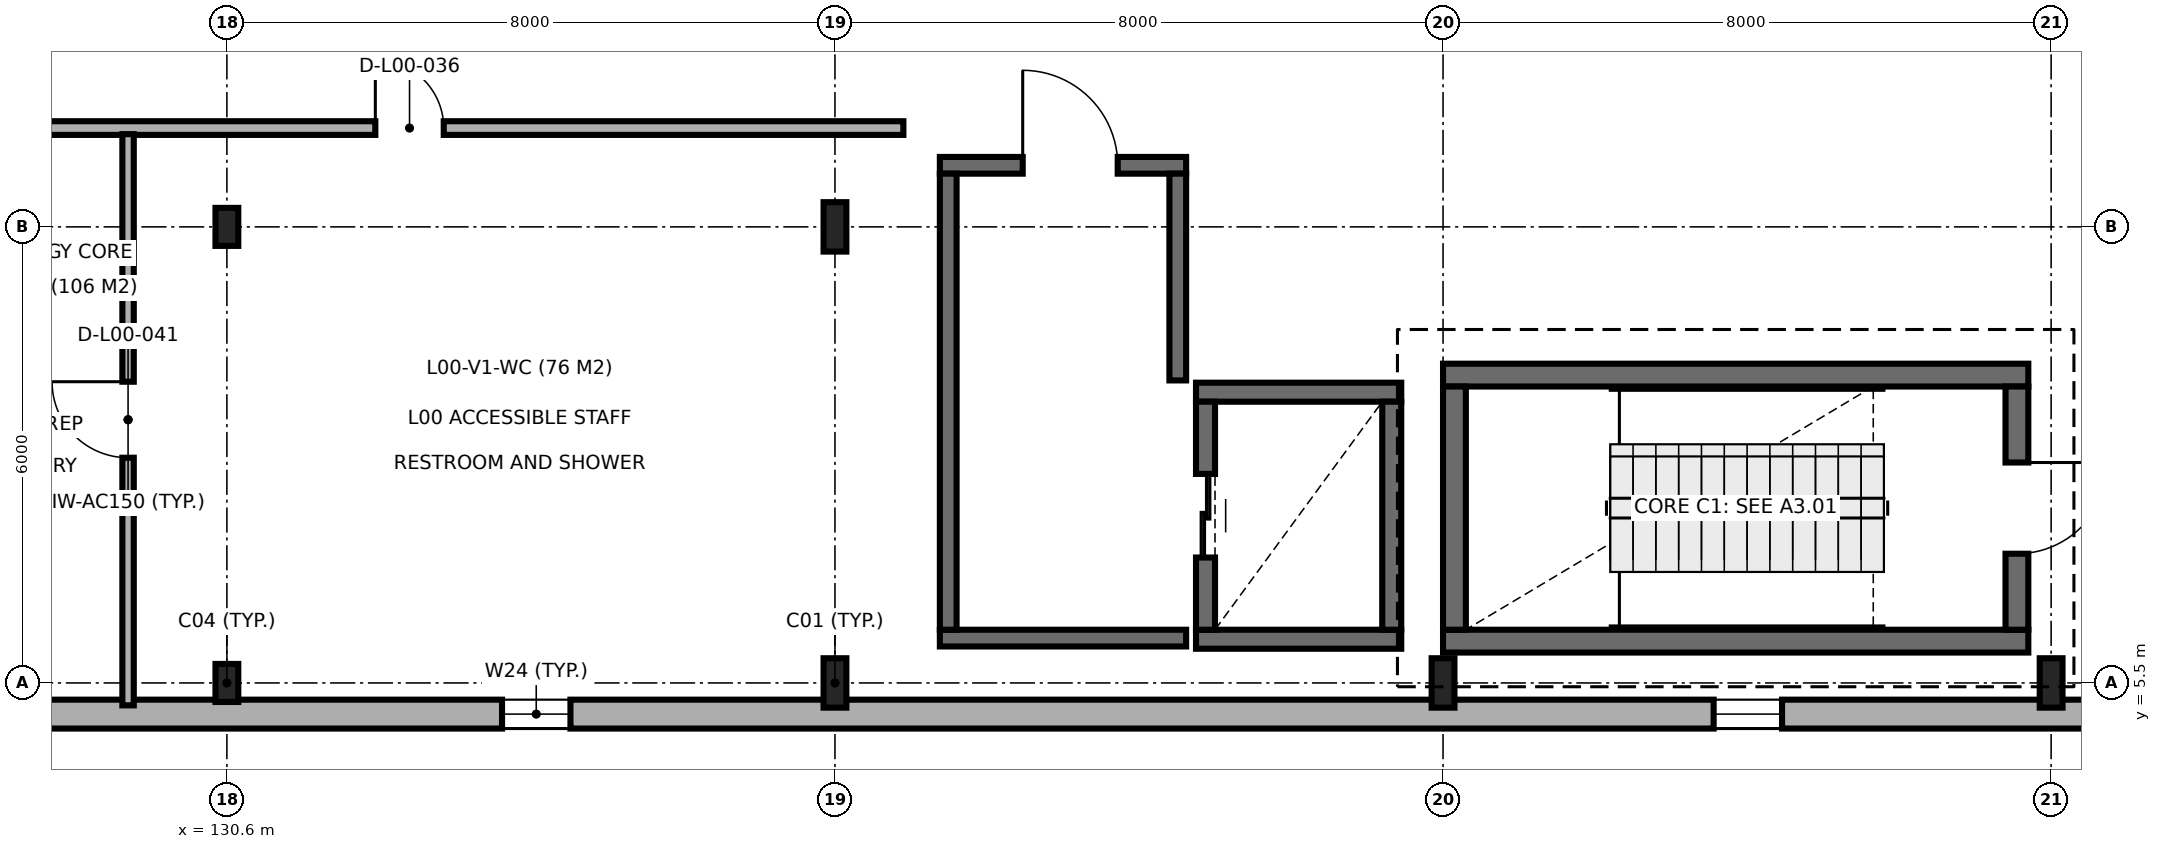
"""IFC4 building model, lengths in metres.
Left out: names, types, materials, properties, quantities, classifications, styles, units other than length and angle.
Written with IfcOpenShell. Run it as: python <this file> out.ifc"""

import sys

from ifc_helpers import new_model, si_unit, direction, frame, frame_2d, origin, origin_2d, place, context, subcontext, project, spatial, rectangle, i_section, extrude, element, fill, save


model = new_model("IFC4")
c1 = context("Model", 3, precision=1e-05, world=origin(), true_north=direction((0.0, 1.0)))
c2 = subcontext(c1, "Body", "Model", "MODEL_VIEW")
j1 = project(units=[si_unit("LENGTHUNIT", "METRE"), si_unit("PLANEANGLEUNIT", "RADIAN")], contexts=[c1])
p1 = place(None, origin())
s1 = spatial("IfcSite", under=j1, at=p1, CompositionType="ELEMENT")
p2 = place(p1, origin())
s2 = spatial("IfcBuilding", under=s1, at=p2, CompositionType="ELEMENT")
p3 = place(p2, origin())
s3 = spatial("IfcBuildingStorey", under=s2, at=p3, CompositionType="ELEMENT", Elevation=0.0)
for number, where, z_axis, x_axis in (
    (1, (130.6, 5.5, 0.0), (0.0, 0.0, 1.0), (1.0, 0.0, 0.0)),
    (2, (130.6, 11.5, 0.0), (0.0, 0.0, 1.0), (1.0, 0.0, 0.0)),
):
    element("IfcColumn", number, at=place(p3, frame(where, z_axis=z_axis, x_axis=x_axis)), inside=s3, PredefinedType="COLUMN", context=c2, shape_type="SweptSolid", body=[
        extrude(i_section(OverallWidth=0.3, OverallDepth=0.5, WebThickness=0.014, FlangeThickness=0.028, FilletRadius=0.027, at=origin_2d()), origin(), (0.0, 0.0, 1.0), 4.8),
    ])
for number, where, z_axis, x_axis in (
    (3, (138.6, 5.5, 0.0), (0.0, 0.0, 1.0), (1.0, 0.0, 0.0)),
    (4, (138.6, 11.5, 0.0), (0.0, 0.0, 1.0), (1.0, 0.0, 0.0)),
    (5, (146.6, 5.5, 0.0), (0.0, 0.0, 1.0), (1.0, 0.0, 0.0)),
    (6, (154.6, 5.5, 0.0), (0.0, 0.0, 1.0), (1.0, 0.0, 0.0)),
):
    element("IfcColumn", number, at=place(p3, frame(where, z_axis=z_axis, x_axis=x_axis)), inside=s3, PredefinedType="COLUMN", context=c2, shape_type="SweptSolid", body=[
        extrude(i_section(OverallWidth=0.3, OverallDepth=0.65, WebThickness=0.016, FlangeThickness=0.031, FilletRadius=0.027, at=origin_2d()), origin(), (0.0, 0.0, 1.0), 4.8),
    ])
for number, where, z_axis, x_axis in (
    (7, (146.6, 6.05, 0.0), (0.0, 0.0, 1.0), (1.0, 0.0, 0.0)),
    (8, (154.3, 9.55, 0.0), (0.0, 0.0, 1.0), (-1.0, 0.0, 0.0)),
):
    element("IfcWall", number, at=place(p3, frame(where, z_axis=z_axis, x_axis=x_axis)), inside=s3, PredefinedType="SHEAR", context=c2, shape_type="SweptSolid", body=[
        extrude(rectangle(XDim=7.7, YDim=0.3, at=frame_2d((3.85, 0.0))), origin(), (0.0, 0.0, 1.0), 4.8),
    ])
p4 = place(p3, frame((146.75, 9.4, 0.0), z_axis=(0.0, 0.0, 1.0), x_axis=(0.0, -1.0, 0.0)))
e9 = element("IfcWall", 9, at=p4, inside=s3, PredefinedType="SHEAR", context=c2, shape_type="SweptSolid", body=[
    extrude(rectangle(XDim=3.2, YDim=0.3, at=frame_2d((1.6, 0.0))), origin(), (0.0, 0.0, 1.0), 4.8),
])
p5 = place(p3, frame((154.15, 6.2, 0.0), z_axis=(0.0, 0.0, 1.0), x_axis=(0.0, 1.0, 0.0)))
e10 = element("IfcWall", 10, at=p5, inside=s3, PredefinedType="SHEAR", context=c2, shape_type="SweptSolid", body=[
    extrude(rectangle(XDim=3.2, YDim=0.3, at=frame_2d((1.6, 0.0))), origin(), (0.0, 0.0, 1.0), 4.8),
])
p6 = place(p5, frame((1.0, 0.0, 0.0)))
e11 = element("IfcOpeningElement", 11, at=p6, cuts=e10, PredefinedType="OPENING", context=c2, shape_type="SweptSolid", body=[
    extrude(rectangle(XDim=1.2, YDim=2.15, at=frame_2d((0.6, 1.075))), frame((0.0, 0.16, 0.0), z_axis=(0.0, -1.0, 0.0), x_axis=(1.0, 0.0, 0.0)), (0.0, 0.0, 1.0), 0.32),
])
for number, where, z_axis, x_axis in (
    (12, (143.35, 6.075, 0.0), (0.0, 0.0, 1.0), (1.0, 0.0, 0.0)),
    (13, (146.05, 9.325, 0.0), (0.0, 0.0, 1.0), (-1.0, 0.0, 0.0)),
):
    element("IfcWall", number, at=place(p3, frame(where, z_axis=z_axis, x_axis=x_axis)), inside=s3, PredefinedType="SHEAR", context=c2, shape_type="SweptSolid", body=[
        extrude(rectangle(XDim=2.7, YDim=0.25, at=frame_2d((1.35, 0.0))), origin(), (0.0, 0.0, 1.0), 4.8),
    ])
p7 = place(p3, frame((143.475, 9.2, 0.0), z_axis=(0.0, 0.0, 1.0), x_axis=(0.0, -1.0, 0.0)))
e14 = element("IfcWall", 14, at=p7, inside=s3, PredefinedType="SHEAR", context=c2, shape_type="SweptSolid", body=[
    extrude(rectangle(XDim=3.0, YDim=0.25, at=frame_2d((1.5, 0.0))), origin(), (0.0, 0.0, 1.0), 4.8),
])
p8 = place(p7, frame((0.95, 0.0, 0.0)))
e15 = element("IfcOpeningElement", 15, at=p8, cuts=e14, PredefinedType="OPENING", context=c2, shape_type="SweptSolid", body=[
    extrude(rectangle(XDim=1.1, YDim=2.15, at=frame_2d((0.55, 1.075))), frame((0.0, 0.135, 0.0), z_axis=(0.0, -1.0, 0.0), x_axis=(1.0, 0.0, 0.0)), (0.0, 0.0, 1.0), 0.27),
])
p9 = place(p3, frame((145.925, 6.2, 0.0), z_axis=(0.0, 0.0, 1.0), x_axis=(0.0, 1.0, 0.0)))
e16 = element("IfcWall", 16, at=p9, inside=s3, PredefinedType="SHEAR", context=c2, shape_type="SweptSolid", body=[
    extrude(rectangle(XDim=3.0, YDim=0.25, at=frame_2d((1.5, 0.0))), origin(), (0.0, 0.0, 1.0), 4.8),
])
p10 = place(p3, frame((139.98, 6.09, 0.0), z_axis=(0.0, 0.0, 1.0), x_axis=(1.0, 0.0, 0.0)))
e17 = element("IfcWall", 17, at=p10, inside=s3, PredefinedType="SOLIDWALL", context=c2, shape_type="SweptSolid", body=[
    extrude(rectangle(XDim=3.24, YDim=0.22, at=frame_2d((1.62, 0.0))), origin(), (0.0, 0.0, 1.0), 4.55),
])
p11 = place(p3, frame((143.22, 12.31, 0.0), z_axis=(0.0, 0.0, 1.0), x_axis=(-1.0, 0.0, 0.0)))
e18 = element("IfcWall", 18, at=p11, inside=s3, PredefinedType="SOLIDWALL", context=c2, shape_type="SweptSolid", body=[
    extrude(rectangle(XDim=3.24, YDim=0.22, at=frame_2d((1.62, 0.0))), origin(), (0.0, 0.0, 1.0), 4.55),
])
p12 = place(p11, frame((0.9, 0.0, 0.0)))
e19 = element("IfcOpeningElement", 19, at=p12, cuts=e18, PredefinedType="OPENING", context=c2, shape_type="SweptSolid", body=[
    extrude(rectangle(XDim=1.25, YDim=2.15, at=frame_2d((0.625, 1.075))), frame((0.0, 0.12, 0.0), z_axis=(0.0, -1.0, 0.0), x_axis=(1.0, 0.0, 0.0)), (0.0, 0.0, 1.0), 0.24),
])
p13 = place(p3, frame((140.09, 12.2, 0.0), z_axis=(0.0, 0.0, 1.0), x_axis=(0.0, -1.0, 0.0)))
e20 = element("IfcWall", 20, at=p13, inside=s3, PredefinedType="SOLIDWALL", context=c2, shape_type="SweptSolid", body=[
    extrude(rectangle(XDim=6.0, YDim=0.22, at=frame_2d((3.0, 0.0))), origin(), (0.0, 0.0, 1.0), 4.55),
])
p14 = place(p3, frame((143.11, 9.48, 0.0), z_axis=(0.0, 0.0, 1.0), x_axis=(0.0, 1.0, 0.0)))
e21 = element("IfcWall", 21, at=p14, inside=s3, PredefinedType="SOLIDWALL", context=c2, shape_type="SweptSolid", body=[
    extrude(rectangle(XDim=2.72, YDim=0.22, at=frame_2d((1.36, 0.0))), origin(), (0.0, 0.0, 1.0), 4.55),
])
p15 = place(p3, frame((105.062, 5.09, 0.0), z_axis=(0.0, 0.0, 1.0), x_axis=(1.0, 0.0, 0.0)))
e22 = element("IfcWall", 22, at=p15, inside=s3, PredefinedType="SOLIDWALL", context=c2, shape_type="SweptSolid", body=[
    extrude(rectangle(XDim=59.338, YDim=0.38, at=frame_2d((29.669, 0.0))), origin(), (0.0, 0.0, 1.0), 4.55),
])
p16 = place(p15, frame((4.538, 0.0, 0.0)))
e23 = element("IfcOpeningElement", 23, at=p16, cuts=e22, PredefinedType="OPENING", context=c2, shape_type="SweptSolid", body=[
    extrude(rectangle(XDim=2.0, YDim=2.4, at=frame_2d((1.0, 1.2))), frame((0.0, 0.2, 0.0), z_axis=(0.0, -1.0, 0.0), x_axis=(1.0, 0.0, 0.0)), (0.0, 0.0, 1.0), 0.4),
])
p17 = place(p15, frame((20.538, 0.0, 0.0)))
e24 = element("IfcOpeningElement", 24, at=p17, cuts=e22, PredefinedType="OPENING", context=c2, shape_type="SweptSolid", body=[
    extrude(rectangle(XDim=2.0, YDim=2.4, at=frame_2d((1.0, 1.2))), frame((0.0, 0.2, 0.0), z_axis=(0.0, -1.0, 0.0), x_axis=(1.0, 0.0, 0.0)), (0.0, 0.0, 1.0), 0.4),
])
p18 = place(p15, frame((12.538, 0.0, 0.0)))
e25 = element("IfcOpeningElement", 25, at=p18, cuts=e22, PredefinedType="OPENING", context=c2, shape_type="SweptSolid", body=[
    extrude(rectangle(XDim=2.0, YDim=2.4, at=frame_2d((1.0, 1.2))), frame((0.0, 0.2, 0.0), z_axis=(0.0, -1.0, 0.0), x_axis=(1.0, 0.0, 0.0)), (0.0, 0.0, 1.0), 0.4),
])
p19 = place(p15, frame((2.553, 0.0, 0.9)))
e26 = element("IfcOpeningElement", 26, at=p19, cuts=e22, PredefinedType="OPENING", context=c2, shape_type="SweptSolid", body=[
    extrude(rectangle(XDim=0.9, YDim=1.8, at=frame_2d((0.45, 0.9))), frame((0.0, 0.2, 0.0), z_axis=(0.0, -1.0, 0.0), x_axis=(1.0, 0.0, 0.0)), (0.0, 0.0, 1.0), 0.4),
])
p20 = place(p15, frame((7.623, 0.0, 0.9)))
e27 = element("IfcOpeningElement", 27, at=p20, cuts=e22, PredefinedType="OPENING", context=c2, shape_type="SweptSolid", body=[
    extrude(rectangle(XDim=0.9, YDim=1.8, at=frame_2d((0.45, 0.9))), frame((0.0, 0.2, 0.0), z_axis=(0.0, -1.0, 0.0), x_axis=(1.0, 0.0, 0.0)), (0.0, 0.0, 1.0), 0.4),
])
p21 = place(p15, frame((10.633, 0.0, 0.9)))
e28 = element("IfcOpeningElement", 28, at=p21, cuts=e22, PredefinedType="OPENING", context=c2, shape_type="SweptSolid", body=[
    extrude(rectangle(XDim=0.9, YDim=1.8, at=frame_2d((0.45, 0.9))), frame((0.0, 0.2, 0.0), z_axis=(0.0, -1.0, 0.0), x_axis=(1.0, 0.0, 0.0)), (0.0, 0.0, 1.0), 0.4),
])
p22 = place(p15, frame((15.623, 0.0, 0.9)))
e29 = element("IfcOpeningElement", 29, at=p22, cuts=e22, PredefinedType="OPENING", context=c2, shape_type="SweptSolid", body=[
    extrude(rectangle(XDim=0.9, YDim=1.8, at=frame_2d((0.45, 0.9))), frame((0.0, 0.2, 0.0), z_axis=(0.0, -1.0, 0.0), x_axis=(1.0, 0.0, 0.0)), (0.0, 0.0, 1.0), 0.4),
])
p23 = place(p15, frame((18.553, 0.0, 0.9)))
e30 = element("IfcOpeningElement", 30, at=p23, cuts=e22, PredefinedType="OPENING", context=c2, shape_type="SweptSolid", body=[
    extrude(rectangle(XDim=0.9, YDim=1.8, at=frame_2d((0.45, 0.9))), frame((0.0, 0.2, 0.0), z_axis=(0.0, -1.0, 0.0), x_axis=(1.0, 0.0, 0.0)), (0.0, 0.0, 1.0), 0.4),
])
p24 = place(p15, frame((29.158, 0.0, 0.9)))
e31 = element("IfcOpeningElement", 31, at=p24, cuts=e22, PredefinedType="OPENING", context=c2, shape_type="SweptSolid", body=[
    extrude(rectangle(XDim=0.9, YDim=1.8, at=frame_2d((0.45, 0.9))), frame((0.0, 0.2, 0.0), z_axis=(0.0, -1.0, 0.0), x_axis=(1.0, 0.0, 0.0)), (0.0, 0.0, 1.0), 0.4),
])
p25 = place(p15, frame((45.098, 0.0, 0.9)))
e32 = element("IfcOpeningElement", 32, at=p25, cuts=e22, PredefinedType="OPENING", context=c2, shape_type="SweptSolid", body=[
    extrude(rectangle(XDim=0.9, YDim=1.8, at=frame_2d((0.45, 0.9))), frame((0.0, 0.2, 0.0), z_axis=(0.0, -1.0, 0.0), x_axis=(1.0, 0.0, 0.0)), (0.0, 0.0, 1.0), 0.4),
])
p26 = place(p15, frame((50.358, 0.0, 0.9)))
e33 = element("IfcOpeningElement", 33, at=p26, cuts=e22, PredefinedType="OPENING", context=c2, shape_type="SweptSolid", body=[
    extrude(rectangle(XDim=0.9, YDim=1.8, at=frame_2d((0.45, 0.9))), frame((0.0, 0.2, 0.0), z_axis=(0.0, -1.0, 0.0), x_axis=(1.0, 0.0, 0.0)), (0.0, 0.0, 1.0), 0.4),
])
p27 = place(p15, frame((54.968, 0.0, 0.9)))
e34 = element("IfcOpeningElement", 34, at=p27, cuts=e22, PredefinedType="OPENING", context=c2, shape_type="SweptSolid", body=[
    extrude(rectangle(XDim=0.9, YDim=1.8, at=frame_2d((0.45, 0.9))), frame((0.0, 0.2, 0.0), z_axis=(0.0, -1.0, 0.0), x_axis=(1.0, 0.0, 0.0)), (0.0, 0.0, 1.0), 0.4),
])
p28 = place(p3, frame((105.005, 12.8, 0.0), z_axis=(0.0, 0.0, 1.0), x_axis=(1.0, 0.0, 0.0)))
e35 = element("IfcWall", 35, at=p28, inside=s3, PredefinedType="PARTITIONING", context=c2, shape_type="SweptSolid", body=[
    extrude(rectangle(XDim=34.495, YDim=0.18, at=frame_2d((17.248, 0.0))), origin(), (0.0, 0.0, 1.0), 4.55),
])
p29 = place(p28, frame((6.011, 0.0, 0.0)))
e36 = element("IfcOpeningElement", 36, at=p29, cuts=e35, PredefinedType="OPENING", context=c2, shape_type="SweptSolid", body=[
    extrude(rectangle(XDim=1.1, YDim=2.15, at=frame_2d((0.55, 1.075))), frame((0.0, 0.1, 0.0), z_axis=(0.0, -1.0, 0.0), x_axis=(1.0, 0.0, 0.0)), (0.0, 0.0, 1.0), 0.2),
])
p30 = place(p28, frame((11.548, 0.0, 0.0)))
e37 = element("IfcOpeningElement", 37, at=p30, cuts=e35, PredefinedType="OPENING", context=c2, shape_type="SweptSolid", body=[
    extrude(rectangle(XDim=1.5, YDim=2.2, at=frame_2d((0.75, 1.1))), frame((0.0, 0.1, 0.0), z_axis=(0.0, -1.0, 0.0), x_axis=(1.0, 0.0, 0.0)), (0.0, 0.0, 1.0), 0.2),
])
p31 = place(p28, frame((27.548, 0.0, 0.0)))
e38 = element("IfcOpeningElement", 38, at=p31, cuts=e35, PredefinedType="OPENING", context=c2, shape_type="SweptSolid", body=[
    extrude(rectangle(XDim=0.9, YDim=2.1, at=frame_2d((0.45, 1.05))), frame((0.0, 0.1, 0.0), z_axis=(0.0, -1.0, 0.0), x_axis=(1.0, 0.0, 0.0)), (0.0, 0.0, 1.0), 0.2),
])
p32 = place(p3, frame((129.3, 5.205, 0.0), z_axis=(0.0, 0.0, 1.0), x_axis=(0.0, 1.0, 0.0)))
e39 = element("IfcWall", 39, at=p32, inside=s3, PredefinedType="PARTITIONING", context=c2, shape_type="SweptSolid", body=[
    extrude(rectangle(XDim=7.515, YDim=0.15, at=frame_2d((3.757, 0.0))), origin(), (0.0, 0.0, 1.0), 4.55),
])
p33 = place(p32, frame((3.258, 0.0, 0.0)))
e40 = element("IfcOpeningElement", 40, at=p33, cuts=e39, PredefinedType="OPENING", context=c2, shape_type="SweptSolid", body=[
    extrude(rectangle(XDim=1.0, YDim=2.15, at=frame_2d((0.5, 1.075))), frame((0.0, 0.085, 0.0), z_axis=(0.0, -1.0, 0.0), x_axis=(1.0, 0.0, 0.0)), (0.0, 0.0, 1.0), 0.17),
])
p34 = place(p6, frame((1.2, 0.0, 0.0), z_axis=(0.0, 0.0, 1.0), x_axis=(-1.0, 0.0, 0.0)))
e41 = element("IfcDoor", 41, at=p34, inside=s3, OperationType="SINGLE_SWING_RIGHT", PredefinedType="DOOR", context=c2, shape_type="SweptSolid", body=[
    extrude(rectangle(XDim=1.2, YDim=2.15, at=frame_2d((0.6, 1.075))), frame((0.0, 0.025, 0.0), z_axis=(0.0, -1.0, 0.0), x_axis=(1.0, 0.0, 0.0)), (0.0, 0.0, 1.0), 0.05),
])
fill(e11, e41)
p35 = place(p8, origin())
e42 = element("IfcDoor", 42, at=p35, inside=s3, OperationType="DOUBLE_DOOR_SLIDING", PredefinedType="DOOR", context=c2, shape_type="SweptSolid", body=[
    extrude(rectangle(XDim=1.1, YDim=2.15, at=frame_2d((0.55, 1.075))), frame((0.0, 0.025, 0.0), z_axis=(0.0, -1.0, 0.0), x_axis=(1.0, 0.0, 0.0)), (0.0, 0.0, 1.0), 0.05),
])
fill(e15, e42)
p36 = place(p12, frame((1.25, 0.0, 0.0), z_axis=(0.0, 0.0, 1.0), x_axis=(-1.0, 0.0, 0.0)))
e43 = element("IfcDoor", 43, at=p36, inside=s3, OperationType="SINGLE_SWING_RIGHT", PredefinedType="DOOR", context=c2, shape_type="SweptSolid", body=[
    extrude(rectangle(XDim=1.25, YDim=2.15, at=frame_2d((0.625, 1.075))), frame((0.0, 0.025, 0.0), z_axis=(0.0, -1.0, 0.0), x_axis=(1.0, 0.0, 0.0)), (0.0, 0.0, 1.0), 0.05),
])
fill(e19, e43)
p37 = place(p24, origin())
e44 = element("IfcWindow", 44, at=p37, inside=s3, PartitioningType="SINGLE_PANEL", PredefinedType="WINDOW", context=c2, shape_type="SweptSolid", body=[
    extrude(rectangle(XDim=0.9, YDim=1.8, at=frame_2d((0.45, 0.9))), frame((0.0, 0.03, 0.0), z_axis=(0.0, -1.0, 0.0), x_axis=(1.0, 0.0, 0.0)), (0.0, 0.0, 1.0), 0.06),
])
fill(e31, e44)
p38 = place(p25, origin())
e45 = element("IfcWindow", 45, at=p38, inside=s3, PartitioningType="SINGLE_PANEL", PredefinedType="WINDOW", context=c2, shape_type="SweptSolid", body=[
    extrude(rectangle(XDim=0.9, YDim=1.8, at=frame_2d((0.45, 0.9))), frame((0.0, 0.03, 0.0), z_axis=(0.0, -1.0, 0.0), x_axis=(1.0, 0.0, 0.0)), (0.0, 0.0, 1.0), 0.06),
])
fill(e32, e45)
p39 = place(p31, origin())
e46 = element("IfcDoor", 46, at=p39, inside=s3, OperationType="SINGLE_SWING_LEFT", PredefinedType="DOOR", context=c2, shape_type="SweptSolid", body=[
    extrude(rectangle(XDim=0.9, YDim=2.1, at=frame_2d((0.45, 1.05))), frame((0.0, 0.025, 0.0), z_axis=(0.0, -1.0, 0.0), x_axis=(1.0, 0.0, 0.0)), (0.0, 0.0, 1.0), 0.05),
])
fill(e38, e46)
p40 = place(p33, origin())
e47 = element("IfcDoor", 47, at=p40, inside=s3, OperationType="SINGLE_SWING_RIGHT", PredefinedType="DOOR", context=c2, shape_type="SweptSolid", body=[
    extrude(rectangle(XDim=1.0, YDim=2.15, at=frame_2d((0.5, 1.075))), frame((0.0, 0.025, 0.0), z_axis=(0.0, -1.0, 0.0), x_axis=(1.0, 0.0, 0.0)), (0.0, 0.0, 1.0), 0.05),
])
fill(e40, e47)
save(model, sys.argv[1])
